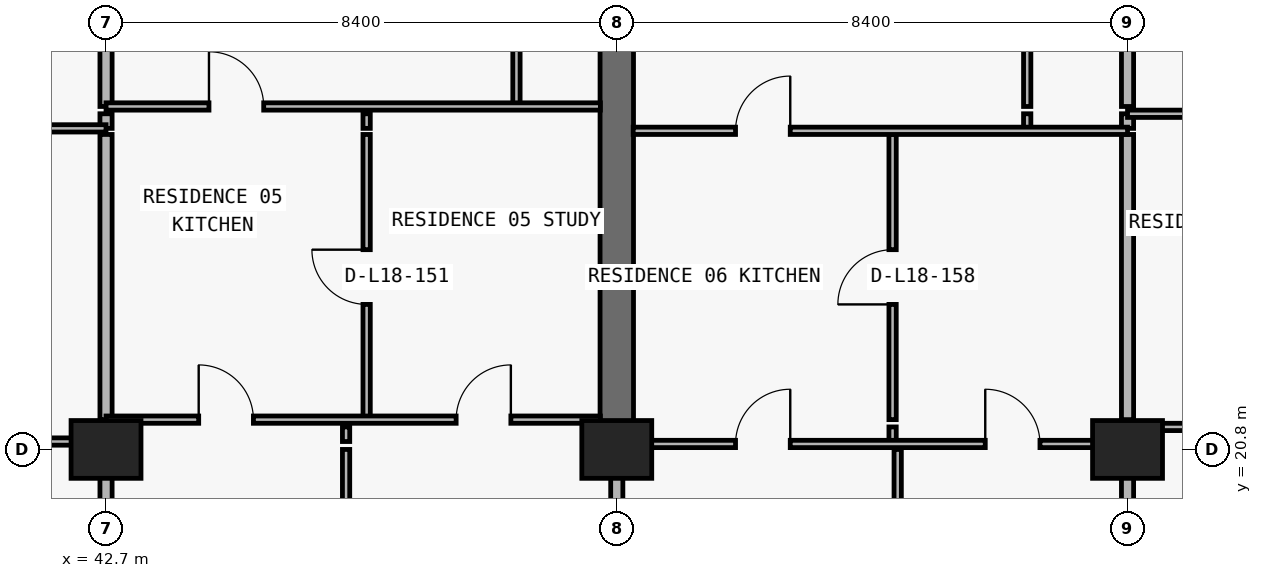
"""IFC4 building model, lengths in metres.
Left out: names, types, materials, properties, quantities, classifications, styles, units other than length and angle.
Written with IfcOpenShell. Run it as: python <this file> out.ifc"""

import sys

from ifc_helpers import new_model, si_unit, direction, frame, frame_2d, origin, origin_2d, place, context, subcontext, project, spatial, rectangle, extrude, element, fill, save


model = new_model("IFC4")
c1 = context("Model", 3, precision=1e-05, world=origin(), true_north=direction((0.0, 1.0)))
c2 = subcontext(c1, "Body", "Model", "MODEL_VIEW")
j1 = project(units=[si_unit("LENGTHUNIT", "METRE"), si_unit("PLANEANGLEUNIT", "RADIAN")], contexts=[c1])
p1 = place(None, origin())
s1 = spatial("IfcSite", under=j1, at=p1, CompositionType="ELEMENT")
p2 = place(p1, origin())
s2 = spatial("IfcBuilding", under=s1, at=p2, CompositionType="ELEMENT")
p3 = place(p2, frame((0.0, 0.0, 69.6)))
s3 = spatial("IfcBuildingStorey", under=s2, at=p3, CompositionType="ELEMENT", Elevation=69.6)
for number, where, z_axis, x_axis in (
    (1, (42.7, 20.8, 0.0), (0.0, 0.0, 1.0), (1.0, 0.0, 0.0)),
    (2, (51.1, 20.8, 0.0), (0.0, 0.0, 1.0), (1.0, 0.0, 0.0)),
    (3, (59.5, 20.8, 0.0), (0.0, 0.0, 1.0), (1.0, 0.0, 0.0)),
):
    element("IfcColumn", number, at=place(p3, frame(where, z_axis=z_axis, x_axis=x_axis)), inside=s3, PredefinedType="COLUMN", context=c2, shape_type="SweptSolid", body=[
        extrude(rectangle(XDim=1.15, YDim=0.95, at=origin_2d()), origin(), (0.0, 0.0, 1.0), 3.05),
    ])
p4 = place(p3, frame((51.1, 20.8, 0.0), z_axis=(0.0, 0.0, 1.0), x_axis=(0.0, 1.0, 0.0)))
e4 = element("IfcWall", 4, at=p4, inside=s3, PredefinedType="SHEAR", context=c2, shape_type="SweptSolid", body=[
    extrude(rectangle(XDim=8.6, YDim=0.55, at=frame_2d((4.3, 0.0))), origin(), (0.0, 0.0, 1.0), 3.05),
])
p5 = place(p3, frame((42.7, 6.24, 0.0), z_axis=(0.0, 0.0, 1.0), x_axis=(0.0, 1.0, 0.0)))
e5 = element("IfcWall", 5, at=p5, inside=s3, PredefinedType="PARTITIONING", context=c2, shape_type="SweptSolid", body=[
    extrude(rectangle(XDim=14.56, YDim=0.2, at=frame_2d((7.28, 0.0))), origin(), (0.0, 0.0, 1.0), 2.11),
])
p6 = place(p3, frame((42.7, 20.93, 0.0), z_axis=(0.0, 0.0, 1.0), x_axis=(0.0, 1.0, 0.0)))
e6 = element("IfcWall", 6, at=p6, inside=s3, PredefinedType="PARTITIONING", context=c2, shape_type="SweptSolid", body=[
    extrude(rectangle(XDim=0.24, YDim=0.2, at=frame_2d((0.12, 0.0))), origin(), (0.0, 0.0, 1.0), 3.05),
])
p7 = place(p3, frame((42.7, 21.29, 0.0), z_axis=(0.0, 0.0, 1.0), x_axis=(0.0, 1.0, 0.0)))
e7 = element("IfcWall", 7, at=p7, inside=s3, PredefinedType="PARTITIONING", context=c2, shape_type="SweptSolid", body=[
    extrude(rectangle(XDim=4.69, YDim=0.2, at=frame_2d((2.345, 0.0))), origin(), (0.0, 0.0, 1.0), 2.11),
])
p8 = place(p3, frame((42.7, 26.08, 0.0), z_axis=(0.0, 0.0, 1.0), x_axis=(0.0, 1.0, 0.0)))
e8 = element("IfcWall", 8, at=p8, inside=s3, PredefinedType="PARTITIONING", context=c2, shape_type="SweptSolid", body=[
    extrude(rectangle(XDim=0.24, YDim=0.2, at=frame_2d((0.12, 0.0))), origin(), (0.0, 0.0, 1.0), 2.11),
])
p9 = place(p3, frame((42.7, 26.44, 0.0), z_axis=(0.0, 0.0, 1.0), x_axis=(0.0, 1.0, 0.0)))
e9 = element("IfcWall", 9, at=p9, inside=s3, PredefinedType="PARTITIONING", context=c2, shape_type="SweptSolid", body=[
    extrude(rectangle(XDim=8.26, YDim=0.2, at=frame_2d((4.13, 0.0))), origin(), (0.0, 0.0, 1.0), 2.11),
])
p10 = place(p3, frame((46.648, 6.24, 0.0), z_axis=(0.0, 0.0, 1.0), x_axis=(0.0, 1.0, 0.0)))
e10 = element("IfcWall", 10, at=p10, inside=s3, PredefinedType="PARTITIONING", context=c2, shape_type="SweptSolid", body=[
    extrude(rectangle(XDim=14.56, YDim=0.12, at=frame_2d((7.28, 0.0))), origin(), (0.0, 0.0, 1.0), 3.05),
])
p11 = place(p3, frame((46.648, 20.93, 0.0), z_axis=(0.0, 0.0, 1.0), x_axis=(0.0, 1.0, 0.0)))
e11 = element("IfcWall", 11, at=p11, inside=s3, PredefinedType="PARTITIONING", context=c2, shape_type="SweptSolid", body=[
    extrude(rectangle(XDim=0.24, YDim=0.12, at=frame_2d((0.12, 0.0))), origin(), (0.0, 0.0, 1.0), 3.05),
])
p12 = place(p3, frame((46.986, 21.29, 0.0), z_axis=(0.0, 0.0, 1.0), x_axis=(0.0, 1.0, 0.0)))
e12 = element("IfcWall", 12, at=p12, inside=s3, PredefinedType="PARTITIONING", context=c2, shape_type="SweptSolid", body=[
    extrude(rectangle(XDim=4.69, YDim=0.12, at=frame_2d((2.345, 0.0))), origin(), (0.0, 0.0, 1.0), 3.05),
])
p13 = place(p12, frame((1.895, 0.0, 0.0)))
e13 = element("IfcOpeningElement", 13, at=p13, cuts=e12, PredefinedType="OPENING", context=c2, shape_type="SweptSolid", body=[
    extrude(rectangle(XDim=0.9, YDim=2.15, at=frame_2d((0.45, 1.075))), frame((0.0, 0.07, 0.0), z_axis=(0.0, -1.0, 0.0), x_axis=(1.0, 0.0, 0.0)), (0.0, 0.0, 1.0), 0.14),
])
p14 = place(p3, frame((46.986, 26.08, 0.0), z_axis=(0.0, 0.0, 1.0), x_axis=(0.0, 1.0, 0.0)))
e14 = element("IfcWall", 14, at=p14, inside=s3, PredefinedType="PARTITIONING", context=c2, shape_type="SweptSolid", body=[
    extrude(rectangle(XDim=0.24, YDim=0.12, at=frame_2d((0.12, 0.0))), origin(), (0.0, 0.0, 1.0), 3.05),
])
p15 = place(p3, frame((49.45, 26.44, 0.0), z_axis=(0.0, 0.0, 1.0), x_axis=(0.0, 1.0, 0.0)))
e15 = element("IfcWall", 15, at=p15, inside=s3, PredefinedType="PARTITIONING", context=c2, shape_type="SweptSolid", body=[
    extrude(rectangle(XDim=8.26, YDim=0.12, at=frame_2d((4.13, 0.0))), origin(), (0.0, 0.0, 1.0), 3.05),
])
p16 = place(p15, frame((4.005, 0.0, 0.0)))
e16 = element("IfcOpeningElement", 16, at=p16, cuts=e15, PredefinedType="OPENING", context=c2, shape_type="SweptSolid", body=[
    extrude(rectangle(XDim=0.85, YDim=2.1, at=frame_2d((0.425, 1.05))), frame((0.0, 0.07, 0.0), z_axis=(0.0, -1.0, 0.0), x_axis=(1.0, 0.0, 0.0)), (0.0, 0.0, 1.0), 0.14),
])
p17 = place(p3, frame((51.1, 6.24, 0.0), z_axis=(0.0, 0.0, 1.0), x_axis=(0.0, 1.0, 0.0)))
e17 = element("IfcWall", 17, at=p17, inside=s3, PredefinedType="PARTITIONING", context=c2, shape_type="SweptSolid", body=[
    extrude(rectangle(XDim=14.555, YDim=0.2, at=frame_2d((7.277, 0.0))), origin(), (0.0, 0.0, 1.0), 2.11),
])
p18 = place(p3, frame((55.636, 20.93, 0.0), z_axis=(0.0, 0.0, 1.0), x_axis=(0.0, 1.0, 0.0)))
e18 = element("IfcWall", 18, at=p18, inside=s3, PredefinedType="PARTITIONING", context=c2, shape_type="SweptSolid", body=[
    extrude(rectangle(XDim=0.24, YDim=0.12, at=frame_2d((0.12, 0.0))), origin(), (0.0, 0.0, 1.0), 3.05),
])
p19 = place(p3, frame((55.636, 21.29, 0.0), z_axis=(0.0, 0.0, 1.0), x_axis=(0.0, 1.0, 0.0)))
e19 = element("IfcWall", 19, at=p19, inside=s3, PredefinedType="PARTITIONING", context=c2, shape_type="SweptSolid", body=[
    extrude(rectangle(XDim=4.69, YDim=0.12, at=frame_2d((2.345, 0.0))), origin(), (0.0, 0.0, 1.0), 3.05),
])
p20 = place(p19, frame((1.895, 0.0, 0.0)))
e20 = element("IfcOpeningElement", 20, at=p20, cuts=e19, PredefinedType="OPENING", context=c2, shape_type="SweptSolid", body=[
    extrude(rectangle(XDim=0.9, YDim=2.15, at=frame_2d((0.45, 1.075))), frame((0.0, 0.07, 0.0), z_axis=(0.0, -1.0, 0.0), x_axis=(1.0, 0.0, 0.0)), (0.0, 0.0, 1.0), 0.14),
])
p21 = place(p3, frame((55.72, 6.24, 0.0), z_axis=(0.0, 0.0, 1.0), x_axis=(0.0, 1.0, 0.0)))
e21 = element("IfcWall", 21, at=p21, inside=s3, PredefinedType="PARTITIONING", context=c2, shape_type="SweptSolid", body=[
    extrude(rectangle(XDim=14.56, YDim=0.12, at=frame_2d((7.28, 0.0))), origin(), (0.0, 0.0, 1.0), 3.05),
])
p22 = place(p3, frame((57.85, 26.08, 0.0), z_axis=(0.0, 0.0, 1.0), x_axis=(0.0, 1.0, 0.0)))
e22 = element("IfcWall", 22, at=p22, inside=s3, PredefinedType="PARTITIONING", context=c2, shape_type="SweptSolid", body=[
    extrude(rectangle(XDim=0.24, YDim=0.12, at=frame_2d((0.12, 0.0))), origin(), (0.0, 0.0, 1.0), 3.05),
])
p23 = place(p3, frame((57.85, 26.44, 0.0), z_axis=(0.0, 0.0, 1.0), x_axis=(0.0, 1.0, 0.0)))
e23 = element("IfcWall", 23, at=p23, inside=s3, PredefinedType="PARTITIONING", context=c2, shape_type="SweptSolid", body=[
    extrude(rectangle(XDim=8.26, YDim=0.12, at=frame_2d((4.13, 0.0))), origin(), (0.0, 0.0, 1.0), 3.05),
])
p24 = place(p23, frame((4.005, 0.0, 0.0)))
e24 = element("IfcOpeningElement", 24, at=p24, cuts=e23, PredefinedType="OPENING", context=c2, shape_type="SweptSolid", body=[
    extrude(rectangle(XDim=0.85, YDim=2.1, at=frame_2d((0.425, 1.05))), frame((0.0, 0.07, 0.0), z_axis=(0.0, -1.0, 0.0), x_axis=(1.0, 0.0, 0.0)), (0.0, 0.0, 1.0), 0.14),
])
p25 = place(p3, frame((59.5, 6.24, 0.0), z_axis=(0.0, 0.0, 1.0), x_axis=(0.0, 1.0, 0.0)))
e25 = element("IfcWall", 25, at=p25, inside=s3, PredefinedType="PARTITIONING", context=c2, shape_type="SweptSolid", body=[
    extrude(rectangle(XDim=14.56, YDim=0.2, at=frame_2d((7.28, 0.0))), origin(), (0.0, 0.0, 1.0), 2.11),
])
p26 = place(p3, frame((59.5, 20.93, 0.0), z_axis=(0.0, 0.0, 1.0), x_axis=(0.0, 1.0, 0.0)))
e26 = element("IfcWall", 26, at=p26, inside=s3, PredefinedType="PARTITIONING", context=c2, shape_type="SweptSolid", body=[
    extrude(rectangle(XDim=0.24, YDim=0.2, at=frame_2d((0.12, 0.0))), origin(), (0.0, 0.0, 1.0), 3.05),
])
p27 = place(p3, frame((59.5, 21.29, 0.0), z_axis=(0.0, 0.0, 1.0), x_axis=(0.0, 1.0, 0.0)))
e27 = element("IfcWall", 27, at=p27, inside=s3, PredefinedType="PARTITIONING", context=c2, shape_type="SweptSolid", body=[
    extrude(rectangle(XDim=4.69, YDim=0.2, at=frame_2d((2.345, 0.0))), origin(), (0.0, 0.0, 1.0), 2.11),
])
p28 = place(p3, frame((59.5, 26.08, 0.0), z_axis=(0.0, 0.0, 1.0), x_axis=(0.0, 1.0, 0.0)))
e28 = element("IfcWall", 28, at=p28, inside=s3, PredefinedType="PARTITIONING", context=c2, shape_type="SweptSolid", body=[
    extrude(rectangle(XDim=0.24, YDim=0.2, at=frame_2d((0.12, 0.0))), origin(), (0.0, 0.0, 1.0), 2.11),
])
p29 = place(p3, frame((59.5, 26.44, 0.0), z_axis=(0.0, 0.0, 1.0), x_axis=(0.0, 1.0, 0.0)))
e29 = element("IfcWall", 29, at=p29, inside=s3, PredefinedType="PARTITIONING", context=c2, shape_type="SweptSolid", body=[
    extrude(rectangle(XDim=8.26, YDim=0.2, at=frame_2d((4.13, 0.0))), origin(), (0.0, 0.0, 1.0), 2.11),
])
p30 = place(p3, frame((51.37, 20.89, 0.0), z_axis=(0.0, 0.0, 1.0), x_axis=(1.0, 0.0, 0.0)))
e30 = element("IfcWall", 30, at=p30, inside=s3, PredefinedType="PARTITIONING", context=c2, shape_type="SweptSolid", body=[
    extrude(rectangle(XDim=8.13, YDim=0.12, at=frame_2d((4.065, 0.0))), origin(), (0.0, 0.0, 1.0), 2.11),
])
p31 = place(p30, frame((1.683, 0.0, 0.0)))
e31 = element("IfcOpeningElement", 31, at=p31, cuts=e30, PredefinedType="OPENING", context=c2, shape_type="SweptSolid", body=[
    extrude(rectangle(XDim=0.9, YDim=2.06, at=frame_2d((0.45, 1.03))), frame((0.0, 0.07, 0.0), z_axis=(0.0, -1.0, 0.0), x_axis=(1.0, 0.0, 0.0)), (0.0, 0.0, 1.0), 0.14),
])
p32 = place(p30, frame((5.79, 0.0, 0.0)))
e32 = element("IfcOpeningElement", 32, at=p32, cuts=e30, PredefinedType="OPENING", context=c2, shape_type="SweptSolid", body=[
    extrude(rectangle(XDim=0.9, YDim=2.06, at=frame_2d((0.45, 1.03))), frame((0.0, 0.07, 0.0), z_axis=(0.0, -1.0, 0.0), x_axis=(1.0, 0.0, 0.0)), (0.0, 0.0, 1.0), 0.14),
])
p33 = place(p3, frame((35.1, 20.93, 0.0), z_axis=(0.0, 0.0, 1.0), x_axis=(1.0, 0.0, 0.0)))
e33 = element("IfcWall", 33, at=p33, inside=s3, PredefinedType="PARTITIONING", context=c2, shape_type="SweptSolid", body=[
    extrude(rectangle(XDim=7.6, YDim=0.12, at=frame_2d((3.8, 0.0))), origin(), (0.0, 0.0, 1.0), 2.11),
])
p34 = place(p33, frame((1.64, 0.0, 0.0)))
e34 = element("IfcOpeningElement", 34, at=p34, cuts=e33, PredefinedType="OPENING", context=c2, shape_type="SweptSolid", body=[
    extrude(rectangle(XDim=0.9, YDim=2.06, at=frame_2d((0.45, 1.03))), frame((0.0, 0.07, 0.0), z_axis=(0.0, -1.0, 0.0), x_axis=(1.0, 0.0, 0.0)), (0.0, 0.0, 1.0), 0.14),
])
p35 = place(p33, frame((5.527, 0.0, 0.0)))
e35 = element("IfcOpeningElement", 35, at=p35, cuts=e33, PredefinedType="OPENING", context=c2, shape_type="SweptSolid", body=[
    extrude(rectangle(XDim=0.9, YDim=2.06, at=frame_2d((0.45, 1.03))), frame((0.0, 0.07, 0.0), z_axis=(0.0, -1.0, 0.0), x_axis=(1.0, 0.0, 0.0)), (0.0, 0.0, 1.0), 0.14),
])
p36 = place(p3, frame((59.5, 21.17, 0.0), z_axis=(0.0, 0.0, 1.0), x_axis=(1.0, 0.0, 0.0)))
e36 = element("IfcWall", 36, at=p36, inside=s3, PredefinedType="PARTITIONING", context=c2, shape_type="SweptSolid", body=[
    extrude(rectangle(XDim=8.4, YDim=0.12, at=frame_2d((4.2, 0.0))), origin(), (0.0, 0.0, 1.0), 3.05),
])
p37 = place(p36, frame((1.524, 0.0, 0.0)))
e37 = element("IfcOpeningElement", 37, at=p37, cuts=e36, PredefinedType="OPENING", context=c2, shape_type="SweptSolid", body=[
    extrude(rectangle(XDim=0.9, YDim=2.15, at=frame_2d((0.45, 1.075))), frame((0.0, 0.07, 0.0), z_axis=(0.0, -1.0, 0.0), x_axis=(1.0, 0.0, 0.0)), (0.0, 0.0, 1.0), 0.14),
])
p38 = place(p36, frame((6.143, 0.0, 0.0)))
e38 = element("IfcOpeningElement", 38, at=p38, cuts=e36, PredefinedType="OPENING", context=c2, shape_type="SweptSolid", body=[
    extrude(rectangle(XDim=0.9, YDim=2.15, at=frame_2d((0.45, 1.075))), frame((0.0, 0.07, 0.0), z_axis=(0.0, -1.0, 0.0), x_axis=(1.0, 0.0, 0.0)), (0.0, 0.0, 1.0), 0.14),
])
p39 = place(p3, frame((42.7, 21.29, 0.0), z_axis=(0.0, 0.0, 1.0), x_axis=(1.0, 0.0, 0.0)))
e39 = element("IfcWall", 39, at=p39, inside=s3, PredefinedType="PARTITIONING", context=c2, shape_type="SweptSolid", body=[
    extrude(rectangle(XDim=8.13, YDim=0.12, at=frame_2d((4.065, 0.0))), origin(), (0.0, 0.0, 1.0), 3.05),
])
p40 = place(p39, frame((1.524, 0.0, 0.0)))
e40 = element("IfcOpeningElement", 40, at=p40, cuts=e39, PredefinedType="OPENING", context=c2, shape_type="SweptSolid", body=[
    extrude(rectangle(XDim=0.9, YDim=2.15, at=frame_2d((0.45, 1.075))), frame((0.0, 0.07, 0.0), z_axis=(0.0, -1.0, 0.0), x_axis=(1.0, 0.0, 0.0)), (0.0, 0.0, 1.0), 0.14),
])
p41 = place(p39, frame((5.758, 0.0, 0.0)))
e41 = element("IfcOpeningElement", 41, at=p41, cuts=e39, PredefinedType="OPENING", context=c2, shape_type="SweptSolid", body=[
    extrude(rectangle(XDim=0.9, YDim=2.15, at=frame_2d((0.45, 1.075))), frame((0.0, 0.07, 0.0), z_axis=(0.0, -1.0, 0.0), x_axis=(1.0, 0.0, 0.0)), (0.0, 0.0, 1.0), 0.14),
])
p42 = place(p3, frame((51.37, 26.04, 0.0), z_axis=(0.0, 0.0, 1.0), x_axis=(1.0, 0.0, 0.0)))
e42 = element("IfcWall", 42, at=p42, inside=s3, PredefinedType="PARTITIONING", context=c2, shape_type="SweptSolid", body=[
    extrude(rectangle(XDim=8.13, YDim=0.12, at=frame_2d((4.065, 0.0))), origin(), (0.0, 0.0, 1.0), 3.05),
])
p43 = place(p42, frame((1.683, 0.0, 0.0)))
e43 = element("IfcOpeningElement", 43, at=p43, cuts=e42, PredefinedType="OPENING", context=c2, shape_type="SweptSolid", body=[
    extrude(rectangle(XDim=0.9, YDim=2.15, at=frame_2d((0.45, 1.075))), frame((0.0, 0.07, 0.0), z_axis=(0.0, -1.0, 0.0), x_axis=(1.0, 0.0, 0.0)), (0.0, 0.0, 1.0), 0.14),
])
p44 = place(p3, frame((35.1, 26.08, 0.0), z_axis=(0.0, 0.0, 1.0), x_axis=(1.0, 0.0, 0.0)))
e44 = element("IfcWall", 44, at=p44, inside=s3, PredefinedType="PARTITIONING", context=c2, shape_type="SweptSolid", body=[
    extrude(rectangle(XDim=7.6, YDim=0.12, at=frame_2d((3.8, 0.0))), origin(), (0.0, 0.0, 1.0), 3.05),
])
p45 = place(p44, frame((1.727, 0.0, 0.0)))
e45 = element("IfcOpeningElement", 45, at=p45, cuts=e44, PredefinedType="OPENING", context=c2, shape_type="SweptSolid", body=[
    extrude(rectangle(XDim=0.9, YDim=2.15, at=frame_2d((0.45, 1.075))), frame((0.0, 0.07, 0.0), z_axis=(0.0, -1.0, 0.0), x_axis=(1.0, 0.0, 0.0)), (0.0, 0.0, 1.0), 0.14),
])
p46 = place(p3, frame((59.5, 26.32, 0.0), z_axis=(0.0, 0.0, 1.0), x_axis=(1.0, 0.0, 0.0)))
e46 = element("IfcWall", 46, at=p46, inside=s3, PredefinedType="PARTITIONING", context=c2, shape_type="SweptSolid", body=[
    extrude(rectangle(XDim=8.4, YDim=0.12, at=frame_2d((4.2, 0.0))), origin(), (0.0, 0.0, 1.0), 3.05),
])
p47 = place(p46, frame((1.943, 0.0, 0.0)))
e47 = element("IfcOpeningElement", 47, at=p47, cuts=e46, PredefinedType="OPENING", context=c2, shape_type="SweptSolid", body=[
    extrude(rectangle(XDim=0.9, YDim=2.15, at=frame_2d((0.45, 1.075))), frame((0.0, 0.07, 0.0), z_axis=(0.0, -1.0, 0.0), x_axis=(1.0, 0.0, 0.0)), (0.0, 0.0, 1.0), 0.14),
])
p48 = place(p3, frame((42.7, 26.44, 0.0), z_axis=(0.0, 0.0, 1.0), x_axis=(1.0, 0.0, 0.0)))
e48 = element("IfcWall", 48, at=p48, inside=s3, PredefinedType="PARTITIONING", context=c2, shape_type="SweptSolid", body=[
    extrude(rectangle(XDim=8.13, YDim=0.12, at=frame_2d((4.065, 0.0))), origin(), (0.0, 0.0, 1.0), 3.05),
])
p49 = place(p48, frame((1.693, 0.0, 0.0)))
e49 = element("IfcOpeningElement", 49, at=p49, cuts=e48, PredefinedType="OPENING", context=c2, shape_type="SweptSolid", body=[
    extrude(rectangle(XDim=0.9, YDim=2.15, at=frame_2d((0.45, 1.075))), frame((0.0, 0.07, 0.0), z_axis=(0.0, -1.0, 0.0), x_axis=(1.0, 0.0, 0.0)), (0.0, 0.0, 1.0), 0.14),
])
p50 = place(p49, origin())
e50 = element("IfcDoor", 50, at=p50, inside=s3, OperationType="SINGLE_SWING_LEFT", PredefinedType="DOOR", context=c2, shape_type="SweptSolid", body=[
    extrude(rectangle(XDim=0.9, YDim=2.15, at=frame_2d((0.45, 1.075))), frame((0.0, 0.025, 0.0), z_axis=(0.0, -1.0, 0.0), x_axis=(1.0, 0.0, 0.0)), (0.0, 0.0, 1.0), 0.05),
])
fill(e49, e50)
p51 = place(p13, origin())
e51 = element("IfcDoor", 51, at=p51, inside=s3, OperationType="SINGLE_SWING_RIGHT", PredefinedType="DOOR", context=c2, shape_type="SweptSolid", body=[
    extrude(rectangle(XDim=0.9, YDim=2.15, at=frame_2d((0.45, 1.075))), frame((0.0, 0.025, 0.0), z_axis=(0.0, -1.0, 0.0), x_axis=(1.0, 0.0, 0.0)), (0.0, 0.0, 1.0), 0.05),
])
fill(e13, e51)
p52 = place(p40, origin())
e52 = element("IfcDoor", 52, at=p52, inside=s3, OperationType="SINGLE_SWING_LEFT", PredefinedType="DOOR", context=c2, shape_type="SweptSolid", body=[
    extrude(rectangle(XDim=0.9, YDim=2.15, at=frame_2d((0.45, 1.075))), frame((0.0, 0.025, 0.0), z_axis=(0.0, -1.0, 0.0), x_axis=(1.0, 0.0, 0.0)), (0.0, 0.0, 1.0), 0.05),
])
fill(e40, e52)
p53 = place(p41, origin())
e53 = element("IfcDoor", 53, at=p53, inside=s3, OperationType="SINGLE_SWING_RIGHT", PredefinedType="DOOR", context=c2, shape_type="SweptSolid", body=[
    extrude(rectangle(XDim=0.9, YDim=2.15, at=frame_2d((0.45, 1.075))), frame((0.0, 0.025, 0.0), z_axis=(0.0, -1.0, 0.0), x_axis=(1.0, 0.0, 0.0)), (0.0, 0.0, 1.0), 0.05),
])
fill(e41, e53)
p54 = place(p43, origin())
e54 = element("IfcDoor", 54, at=p54, inside=s3, OperationType="SINGLE_SWING_RIGHT", PredefinedType="DOOR", context=c2, shape_type="SweptSolid", body=[
    extrude(rectangle(XDim=0.9, YDim=2.15, at=frame_2d((0.45, 1.075))), frame((0.0, 0.025, 0.0), z_axis=(0.0, -1.0, 0.0), x_axis=(1.0, 0.0, 0.0)), (0.0, 0.0, 1.0), 0.05),
])
fill(e43, e54)
p55 = place(p20, origin())
e55 = element("IfcDoor", 55, at=p55, inside=s3, OperationType="SINGLE_SWING_LEFT", PredefinedType="DOOR", context=c2, shape_type="SweptSolid", body=[
    extrude(rectangle(XDim=0.9, YDim=2.15, at=frame_2d((0.45, 1.075))), frame((0.0, 0.025, 0.0), z_axis=(0.0, -1.0, 0.0), x_axis=(1.0, 0.0, 0.0)), (0.0, 0.0, 1.0), 0.05),
])
fill(e20, e55)
p56 = place(p31, origin())
e56 = element("IfcDoor", 56, at=p56, inside=s3, OperationType="SINGLE_SWING_RIGHT", PredefinedType="DOOR", context=c2, shape_type="SweptSolid", body=[
    extrude(rectangle(XDim=0.9, YDim=2.06, at=frame_2d((0.45, 1.03))), frame((0.0, 0.025, 0.0), z_axis=(0.0, -1.0, 0.0), x_axis=(1.0, 0.0, 0.0)), (0.0, 0.0, 1.0), 0.05),
])
fill(e31, e56)
p57 = place(p32, origin())
e57 = element("IfcDoor", 57, at=p57, inside=s3, OperationType="SINGLE_SWING_LEFT", PredefinedType="DOOR", context=c2, shape_type="SweptSolid", body=[
    extrude(rectangle(XDim=0.9, YDim=2.06, at=frame_2d((0.45, 1.03))), frame((0.0, 0.025, 0.0), z_axis=(0.0, -1.0, 0.0), x_axis=(1.0, 0.0, 0.0)), (0.0, 0.0, 1.0), 0.05),
])
fill(e32, e57)
save(model, sys.argv[1])
